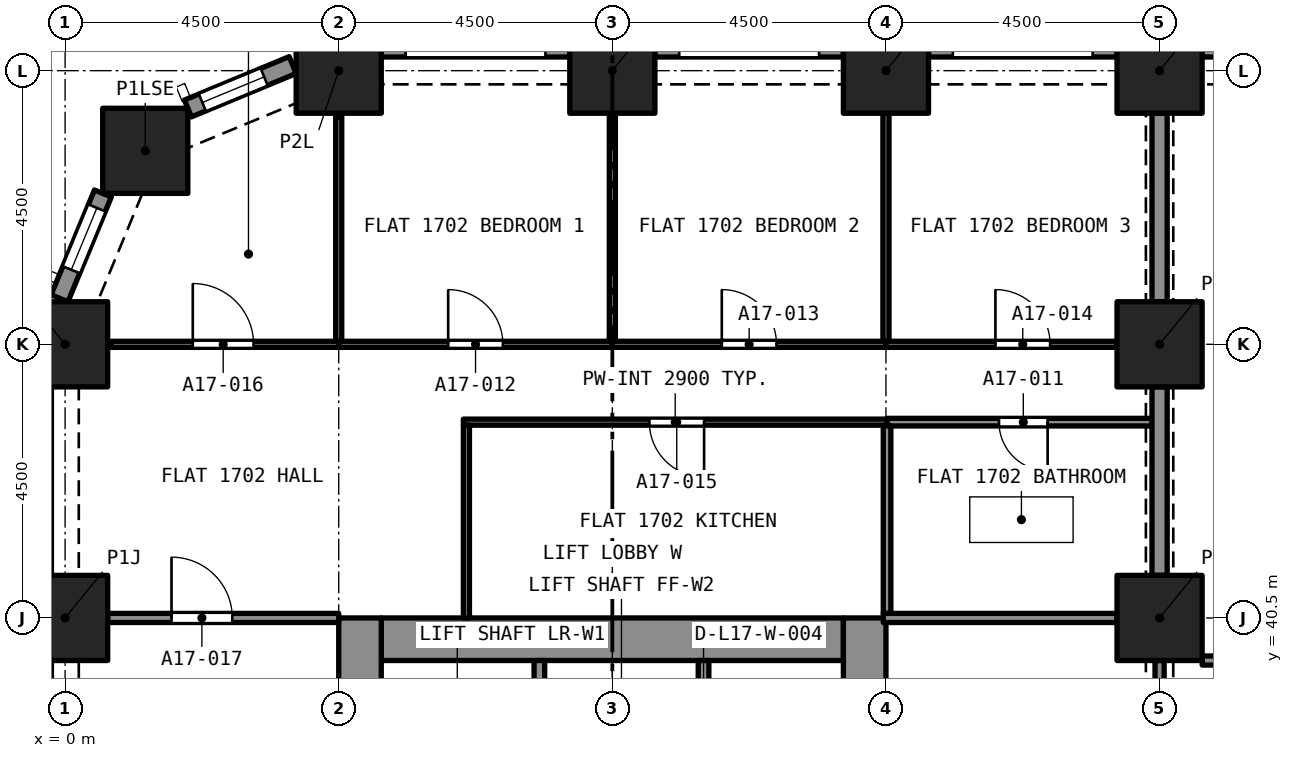
"""IFC4 building model, lengths in metres.
Left out: names, types, materials, properties, quantities, classifications, styles, units other than length and angle.
Written with IfcOpenShell. Run it as: python <this file> out.ifc"""

import sys

from ifc_helpers import new_model, si_unit, direction, frame, frame_2d, origin, origin_2d, place, context, subcontext, project, spatial, rectangle, extrude, element, fill, save


model = new_model("IFC4")
c1 = context("Model", 3, precision=1e-05, world=origin(), true_north=direction((0.0, 1.0)))
c2 = subcontext(c1, "Body", "Model", "MODEL_VIEW")
j1 = project(units=[si_unit("LENGTHUNIT", "METRE"), si_unit("PLANEANGLEUNIT", "RADIAN")], contexts=[c1])
p1 = place(None, origin())
s1 = spatial("IfcSite", under=j1, at=p1, CompositionType="ELEMENT")
p2 = place(p1, origin())
s2 = spatial("IfcBuilding", under=s1, at=p2, CompositionType="ELEMENT")
p3 = place(p2, frame((0.0, 0.0, 65.6)))
s3 = spatial("IfcBuildingStorey", under=s2, at=p3, CompositionType="ELEMENT", Elevation=65.6)
for number, where, z_axis, x_axis in (
    (1, (0.0, 40.5, 0.0), (0.0, 0.0, 1.0), (1.0, 0.0, 0.0)),
    (2, (18.0, 40.5, 0.0), (0.0, 0.0, 1.0), (1.0, 0.0, 0.0)),
    (3, (0.0, 45.0, 0.0), (0.0, 0.0, 1.0), (1.0, 0.0, 0.0)),
    (4, (18.0, 45.0, 0.0), (0.0, 0.0, 1.0), (1.0, 0.0, 0.0)),
    (5, (1.318, 48.182, 0.0), (0.0, 0.0, 1.0), (1.0, 0.0, 0.0)),
    (6, (4.5, 49.5, 0.0), (0.0, 0.0, 1.0), (1.0, 0.0, 0.0)),
    (7, (9.0, 49.5, 0.0), (0.0, 0.0, 1.0), (1.0, 0.0, 0.0)),
    (8, (13.5, 49.5, 0.0), (0.0, 0.0, 1.0), (1.0, 0.0, 0.0)),
    (9, (18.0, 49.5, 0.0), (0.0, 0.0, 1.0), (1.0, 0.0, 0.0)),
):
    element("IfcColumn", number, at=place(p3, frame(where, z_axis=z_axis, x_axis=x_axis)), inside=s3, PredefinedType="COLUMN", context=c2, shape_type="SweptSolid", body=[
        extrude(rectangle(XDim=1.4, YDim=1.4, at=origin_2d()), origin(), (0.0, 0.0, 1.0), 3.2),
    ])
p4 = place(p3, frame((5.2, 40.15, 0.0), z_axis=(0.0, 0.0, 1.0), x_axis=(1.0, 0.0, 0.0)))
e10 = element("IfcWall", 10, at=p4, inside=s3, PredefinedType="SOLIDWALL", context=c2, shape_type="SweptSolid", body=[
    extrude(rectangle(XDim=7.6, YDim=0.7, at=frame_2d((3.8, 0.0))), origin(), (0.0, 0.0, 1.0), 3.2),
])
p5 = place(p3, frame((4.85, 27.0, 0.0), z_axis=(0.0, 0.0, 1.0), x_axis=(0.0, 1.0, 0.0)))
e11 = element("IfcWall", 11, at=p5, inside=s3, PredefinedType="SOLIDWALL", context=c2, shape_type="SweptSolid", body=[
    extrude(rectangle(XDim=13.5, YDim=0.7, at=frame_2d((6.75, 0.0))), origin(), (0.0, 0.0, 1.0), 3.2),
])
p6 = place(p5, frame((8.95, 0.0, 0.0)))
e12 = element("IfcOpeningElement", 12, at=p6, cuts=e11, PredefinedType="OPENING", context=c2, shape_type="SweptSolid", body=[
    extrude(rectangle(XDim=1.2, YDim=2.1, at=frame_2d((0.6, 1.05))), frame((0.0, 0.36, 0.0), z_axis=(0.0, -1.0, 0.0), x_axis=(1.0, 0.0, 0.0)), (0.0, 0.0, 1.0), 0.72),
])
p7 = place(p3, frame((13.15, 27.0, 0.0), z_axis=(0.0, 0.0, 1.0), x_axis=(0.0, 1.0, 0.0)))
e13 = element("IfcWall", 13, at=p7, inside=s3, PredefinedType="SOLIDWALL", context=c2, shape_type="SweptSolid", body=[
    extrude(rectangle(XDim=13.5, YDim=0.7, at=frame_2d((6.75, 0.0))), origin(), (0.0, 0.0, 1.0), 3.2),
])
p8 = place(p7, frame((11.1, 0.0, 0.0)))
e14 = element("IfcOpeningElement", 14, at=p8, cuts=e13, PredefinedType="OPENING", context=c2, shape_type="SweptSolid", body=[
    extrude(rectangle(XDim=1.1, YDim=2.1, at=frame_2d((0.55, 1.05))), frame((0.0, 0.36, 0.0), z_axis=(0.0, -1.0, 0.0), x_axis=(1.0, 0.0, 0.0)), (0.0, 0.0, 1.0), 0.72),
])
p9 = place(p7, frame((8.95, 0.0, 0.0)))
e15 = element("IfcOpeningElement", 15, at=p9, cuts=e13, PredefinedType="OPENING", context=c2, shape_type="SweptSolid", body=[
    extrude(rectangle(XDim=1.2, YDim=2.1, at=frame_2d((0.6, 1.05))), frame((0.0, 0.36, 0.0), z_axis=(0.0, -1.0, 0.0), x_axis=(1.0, 0.0, 0.0)), (0.0, 0.0, 1.0), 0.72),
])
p10 = place(p3, frame((18.7, 49.875, 0.0), z_axis=(0.0, 0.0, 1.0), x_axis=(1.0, 0.0, 0.0)))
e16 = element("IfcWall", 16, at=p10, inside=s3, PredefinedType="SOLIDWALL", context=c2, shape_type="SweptSolid", body=[
    extrude(rectangle(XDim=3.1, YDim=0.3, at=frame_2d((1.55, 0.0))), origin(), (0.0, 0.0, 1.0), 3.2),
])
p11 = place(p10, frame((0.4, 0.0, 0.45)))
e17 = element("IfcOpeningElement", 17, at=p11, cuts=e16, PredefinedType="OPENING", context=c2, shape_type="SweptSolid", body=[
    extrude(rectangle(XDim=2.3, YDim=1.95, at=frame_2d((1.15, 0.975))), frame((0.0, 0.16, 0.0), z_axis=(0.0, -1.0, 0.0), x_axis=(1.0, 0.0, 0.0)), (0.0, 0.0, 1.0), 0.32),
])
p12 = place(p3, frame((14.2, 49.875, 0.0), z_axis=(0.0, 0.0, 1.0), x_axis=(1.0, 0.0, 0.0)))
e18 = element("IfcWall", 18, at=p12, inside=s3, PredefinedType="SOLIDWALL", context=c2, shape_type="SweptSolid", body=[
    extrude(rectangle(XDim=3.1, YDim=0.3, at=frame_2d((1.55, 0.0))), origin(), (0.0, 0.0, 1.0), 3.2),
])
p13 = place(p12, frame((0.4, 0.0, 0.45)))
e19 = element("IfcOpeningElement", 19, at=p13, cuts=e18, PredefinedType="OPENING", context=c2, shape_type="SweptSolid", body=[
    extrude(rectangle(XDim=2.3, YDim=1.95, at=frame_2d((1.15, 0.975))), frame((0.0, 0.16, 0.0), z_axis=(0.0, -1.0, 0.0), x_axis=(1.0, 0.0, 0.0)), (0.0, 0.0, 1.0), 0.32),
])
p14 = place(p3, frame((9.7, 49.875, 0.0), z_axis=(0.0, 0.0, 1.0), x_axis=(1.0, 0.0, 0.0)))
e20 = element("IfcWall", 20, at=p14, inside=s3, PredefinedType="SOLIDWALL", context=c2, shape_type="SweptSolid", body=[
    extrude(rectangle(XDim=3.1, YDim=0.3, at=frame_2d((1.55, 0.0))), origin(), (0.0, 0.0, 1.0), 3.2),
])
p15 = place(p14, frame((0.4, 0.0, 0.45)))
e21 = element("IfcOpeningElement", 21, at=p15, cuts=e20, PredefinedType="OPENING", context=c2, shape_type="SweptSolid", body=[
    extrude(rectangle(XDim=2.3, YDim=1.95, at=frame_2d((1.15, 0.975))), frame((0.0, 0.16, 0.0), z_axis=(0.0, -1.0, 0.0), x_axis=(1.0, 0.0, 0.0)), (0.0, 0.0, 1.0), 0.32),
])
p16 = place(p3, frame((5.2, 49.875, 0.0), z_axis=(0.0, 0.0, 1.0), x_axis=(1.0, 0.0, 0.0)))
e22 = element("IfcWall", 22, at=p16, inside=s3, PredefinedType="SOLIDWALL", context=c2, shape_type="SweptSolid", body=[
    extrude(rectangle(XDim=3.1, YDim=0.3, at=frame_2d((1.55, 0.0))), origin(), (0.0, 0.0, 1.0), 3.2),
])
p17 = place(p16, frame((0.4, 0.0, 0.45)))
e23 = element("IfcOpeningElement", 23, at=p17, cuts=e22, PredefinedType="OPENING", context=c2, shape_type="SweptSolid", body=[
    extrude(rectangle(XDim=2.3, YDim=1.95, at=frame_2d((1.15, 0.975))), frame((0.0, 0.16, 0.0), z_axis=(0.0, -1.0, 0.0), x_axis=(1.0, 0.0, 0.0)), (0.0, 0.0, 1.0), 0.32),
])
p18 = place(p3, frame((2.02, 48.878, 0.0), z_axis=(0.0, 0.0, 1.0), x_axis=(0.923903565336, 0.38262540684, 0.0)))
e24 = element("IfcWall", 24, at=p18, inside=s3, PredefinedType="SOLIDWALL", context=c2, shape_type="SweptSolid", body=[
    extrude(rectangle(XDim=1.865, YDim=0.3, at=frame_2d((0.933, 0.0))), origin(), (0.0, 0.0, 1.0), 3.2),
])
p19 = place(p18, frame((0.258, 0.0, 0.45)))
e25 = element("IfcOpeningElement", 25, at=p19, cuts=e24, PredefinedType="OPENING", context=c2, shape_type="SweptSolid", body=[
    extrude(rectangle(XDim=1.1, YDim=1.95, at=frame_2d((0.55, 0.975))), frame((0.0, 0.16, 0.0), z_axis=(0.0, -1.0, 0.0), x_axis=(1.0, 0.0, 0.0)), (0.0, 0.0, 1.0), 0.32),
])
p20 = place(p3, frame((-0.092, 45.757, 0.0), z_axis=(0.0, 0.0, 1.0), x_axis=(0.382737135771, 0.923857286003, 0.0)))
e26 = element("IfcWall", 26, at=p20, inside=s3, PredefinedType="SOLIDWALL", context=c2, shape_type="SweptSolid", body=[
    extrude(rectangle(XDim=1.865, YDim=0.3, at=frame_2d((0.933, 0.0))), origin(), (0.0, 0.0, 1.0), 3.2),
])
p21 = place(p20, frame((0.508, 0.0, 0.45)))
e27 = element("IfcOpeningElement", 27, at=p21, cuts=e26, PredefinedType="OPENING", context=c2, shape_type="SweptSolid", body=[
    extrude(rectangle(XDim=1.1, YDim=1.95, at=frame_2d((0.55, 0.975))), frame((0.0, 0.16, 0.0), z_axis=(0.0, -1.0, 0.0), x_axis=(1.0, 0.0, 0.0)), (0.0, 0.0, 1.0), 0.32),
])
p22 = place(p3, frame((17.875, 43.72, 0.0), z_axis=(0.0, 0.0, 1.0), x_axis=(-1.0, 0.0, 0.0)))
e28 = element("IfcWall", 28, at=p22, inside=s3, PredefinedType="PARTITIONING", context=c2, shape_type="SweptSolid", body=[
    extrude(rectangle(XDim=4.357, YDim=0.125, at=frame_2d((2.178, 0.0))), origin(), (0.0, 0.0, 1.0), 2.9),
])
p23 = place(p22, frame((1.716, 0.0, 0.0)))
e29 = element("IfcOpeningElement", 29, at=p23, cuts=e28, PredefinedType="OPENING", context=c2, shape_type="SweptSolid", body=[
    extrude(rectangle(XDim=0.8, YDim=2.1, at=frame_2d((0.4, 1.05))), frame((0.0, 0.073, 0.0), z_axis=(0.0, -1.0, 0.0), x_axis=(1.0, 0.0, 0.0)), (0.0, 0.0, 1.0), 0.145),
])
p24 = place(p3, frame((13.518, 40.575, 0.0), z_axis=(0.0, 0.0, 1.0), x_axis=(0.0, 1.0, 0.0)))
e30 = element("IfcWall", 30, at=p24, inside=s3, PredefinedType="PARTITIONING", context=c2, shape_type="SweptSolid", body=[
    extrude(rectangle(XDim=3.083, YDim=0.125, at=frame_2d((1.541, 0.0))), origin(), (0.0, 0.0, 1.0), 2.9),
])
p25 = place(p3, frame((18.0, 41.2, 0.0), z_axis=(0.0, 0.0, 1.0), x_axis=(0.0, 1.0, 0.0)))
e31 = element("IfcWall", 31, at=p25, inside=s3, PredefinedType="PARTITIONING", context=c2, shape_type="SweptSolid", body=[
    extrude(rectangle(XDim=3.1, YDim=0.25, at=frame_2d((1.55, 0.0))), origin(), (0.0, 0.0, 1.0), 2.38),
])
p26 = place(p3, frame((13.456, 40.5, 0.0), z_axis=(0.0, 0.0, 1.0), x_axis=(1.0, 0.0, 0.0)))
e32 = element("IfcWall", 32, at=p26, inside=s3, PredefinedType="PARTITIONING", context=c2, shape_type="SweptSolid", body=[
    extrude(rectangle(XDim=3.844, YDim=0.15, at=frame_2d((1.922, 0.0))), origin(), (0.0, 0.0, 1.0), 2.9),
])
p27 = place(p3, frame((9.0, 45.05, 0.0), z_axis=(0.0, 0.0, 1.0), x_axis=(0.0, 1.0, 0.0)))
e33 = element("IfcWall", 33, at=p27, inside=s3, PredefinedType="PARTITIONING", context=c2, shape_type="SweptSolid", body=[
    extrude(rectangle(XDim=3.75, YDim=0.1, at=frame_2d((1.875, 0.0))), origin(), (0.0, 0.0, 1.0), 2.9),
])
p28 = place(p3, frame((4.5, 45.0, 0.0), z_axis=(0.0, 0.0, 1.0), x_axis=(1.0, 0.0, 0.0)))
e34 = element("IfcWall", 34, at=p28, inside=s3, PredefinedType="PARTITIONING", context=c2, shape_type="SweptSolid", body=[
    extrude(rectangle(XDim=4.5, YDim=0.1, at=frame_2d((2.25, 0.0))), origin(), (0.0, 0.0, 1.0), 2.9),
])
p29 = place(p28, frame((1.8, 0.0, 0.0)))
e35 = element("IfcOpeningElement", 35, at=p29, cuts=e34, PredefinedType="OPENING", context=c2, shape_type="SweptSolid", body=[
    extrude(rectangle(XDim=0.9, YDim=2.1, at=frame_2d((0.45, 1.05))), frame((0.0, 0.06, 0.0), z_axis=(0.0, -1.0, 0.0), x_axis=(1.0, 0.0, 0.0)), (0.0, 0.0, 1.0), 0.12),
])
p30 = place(p3, frame((4.5, 45.05, 0.0), z_axis=(0.0, 0.0, 1.0), x_axis=(0.0, 1.0, 0.0)))
e36 = element("IfcWall", 36, at=p30, inside=s3, PredefinedType="PARTITIONING", context=c2, shape_type="SweptSolid", body=[
    extrude(rectangle(XDim=3.692, YDim=0.1, at=frame_2d((1.846, 0.0))), origin(), (0.0, 0.0, 1.0), 2.9),
])
p31 = place(p3, frame((13.5, 45.05, 0.0), z_axis=(0.0, 0.0, 1.0), x_axis=(0.0, 1.0, 0.0)))
e37 = element("IfcWall", 37, at=p31, inside=s3, PredefinedType="PARTITIONING", context=c2, shape_type="SweptSolid", body=[
    extrude(rectangle(XDim=3.75, YDim=0.1, at=frame_2d((1.875, 0.0))), origin(), (0.0, 0.0, 1.0), 2.9),
])
p32 = place(p3, frame((9.0, 45.0, 0.0), z_axis=(0.0, 0.0, 1.0), x_axis=(1.0, 0.0, 0.0)))
e38 = element("IfcWall", 38, at=p32, inside=s3, PredefinedType="PARTITIONING", context=c2, shape_type="SweptSolid", body=[
    extrude(rectangle(XDim=4.5, YDim=0.1, at=frame_2d((2.25, 0.0))), origin(), (0.0, 0.0, 1.0), 2.9),
])
p33 = place(p32, frame((1.8, 0.0, 0.0)))
e39 = element("IfcOpeningElement", 39, at=p33, cuts=e38, PredefinedType="OPENING", context=c2, shape_type="SweptSolid", body=[
    extrude(rectangle(XDim=0.9, YDim=2.1, at=frame_2d((0.45, 1.05))), frame((0.0, 0.06, 0.0), z_axis=(0.0, -1.0, 0.0), x_axis=(1.0, 0.0, 0.0)), (0.0, 0.0, 1.0), 0.12),
])
p34 = place(p3, frame((13.5, 45.0, 0.0), z_axis=(0.0, 0.0, 1.0), x_axis=(1.0, 0.0, 0.0)))
e40 = element("IfcWall", 40, at=p34, inside=s3, PredefinedType="PARTITIONING", context=c2, shape_type="SweptSolid", body=[
    extrude(rectangle(XDim=3.8, YDim=0.1, at=frame_2d((1.9, 0.0))), origin(), (0.0, 0.0, 1.0), 2.9),
])
p35 = place(p34, frame((1.8, 0.0, 0.0)))
e41 = element("IfcOpeningElement", 41, at=p35, cuts=e40, PredefinedType="OPENING", context=c2, shape_type="SweptSolid", body=[
    extrude(rectangle(XDim=0.9, YDim=2.1, at=frame_2d((0.45, 1.05))), frame((0.0, 0.06, 0.0), z_axis=(0.0, -1.0, 0.0), x_axis=(1.0, 0.0, 0.0)), (0.0, 0.0, 1.0), 0.12),
])
p36 = place(p3, frame((18.0, 45.7, 0.0), z_axis=(0.0, 0.0, 1.0), x_axis=(0.0, 1.0, 0.0)))
e42 = element("IfcWall", 42, at=p36, inside=s3, PredefinedType="PARTITIONING", context=c2, shape_type="SweptSolid", body=[
    extrude(rectangle(XDim=3.1, YDim=0.25, at=frame_2d((1.55, 0.0))), origin(), (0.0, 0.0, 1.0), 2.38),
])
p37 = place(p3, frame((13.518, 43.72, 0.0), z_axis=(0.0, 0.0, 1.0), x_axis=(-1.0, 0.0, 0.0)))
e43 = element("IfcWall", 43, at=p37, inside=s3, PredefinedType="PARTITIONING", context=c2, shape_type="SweptSolid", body=[
    extrude(rectangle(XDim=6.968, YDim=0.1, at=frame_2d((3.484, 0.0))), origin(), (0.0, 0.0, 1.0), 2.9),
])
p38 = place(p37, frame((3.009, 0.0, 0.0)))
e44 = element("IfcOpeningElement", 44, at=p38, cuts=e43, PredefinedType="OPENING", context=c2, shape_type="SweptSolid", body=[
    extrude(rectangle(XDim=0.9, YDim=2.1, at=frame_2d((0.45, 1.05))), frame((0.0, 0.06, 0.0), z_axis=(0.0, -1.0, 0.0), x_axis=(1.0, 0.0, 0.0)), (0.0, 0.0, 1.0), 0.12),
])
p39 = place(p3, frame((6.6, 40.5, 0.0), z_axis=(0.0, 0.0, 1.0), x_axis=(0.0, 1.0, 0.0)))
e45 = element("IfcWall", 45, at=p39, inside=s3, PredefinedType="PARTITIONING", context=c2, shape_type="SweptSolid", body=[
    extrude(rectangle(XDim=3.17, YDim=0.1, at=frame_2d((1.585, 0.0))), origin(), (0.0, 0.0, 1.0), 2.9),
])
p40 = place(p3, frame((0.758, 45.0, 0.0), z_axis=(0.0, 0.0, 1.0), x_axis=(1.0, 0.0, 0.0)))
e46 = element("IfcWall", 46, at=p40, inside=s3, PredefinedType="PARTITIONING", context=c2, shape_type="SweptSolid", body=[
    extrude(rectangle(XDim=3.742, YDim=0.1, at=frame_2d((1.871, 0.0))), origin(), (0.0, 0.0, 1.0), 2.9),
])
p41 = place(p40, frame((1.342, 0.0, 0.0)))
e47 = element("IfcOpeningElement", 47, at=p41, cuts=e46, PredefinedType="OPENING", context=c2, shape_type="SweptSolid", body=[
    extrude(rectangle(XDim=1.0, YDim=2.1, at=frame_2d((0.5, 1.05))), frame((0.0, 0.06, 0.0), z_axis=(0.0, -1.0, 0.0), x_axis=(1.0, 0.0, 0.0)), (0.0, 0.0, 1.0), 0.12),
])
p42 = place(p3, frame((0.7, 40.5, 0.0), z_axis=(0.0, 0.0, 1.0), x_axis=(1.0, 0.0, 0.0)))
e48 = element("IfcWall", 48, at=p42, inside=s3, PredefinedType="PARTITIONING", context=c2, shape_type="SweptSolid", body=[
    extrude(rectangle(XDim=3.8, YDim=0.15, at=frame_2d((1.9, 0.0))), origin(), (0.0, 0.0, 1.0), 2.9),
])
p43 = place(p42, frame((1.05, 0.0, 0.0)))
e49 = element("IfcOpeningElement", 49, at=p43, cuts=e48, PredefinedType="OPENING", context=c2, shape_type="SweptSolid", body=[
    extrude(rectangle(XDim=1.0, YDim=2.1, at=frame_2d((0.5, 1.05))), frame((0.0, 0.085, 0.0), z_axis=(0.0, -1.0, 0.0), x_axis=(1.0, 0.0, 0.0)), (0.0, 0.0, 1.0), 0.17),
])
p44 = place(p3, frame((18.7, 39.8, 0.0), z_axis=(0.0, 0.0, 1.0), x_axis=(1.0, 0.0, 0.0)))
e50 = element("IfcWall", 50, at=p44, inside=s3, PredefinedType="PARTITIONING", context=c2, shape_type="SweptSolid", body=[
    extrude(rectangle(XDim=8.3, YDim=0.15, at=frame_2d((4.15, 0.0))), origin(), (0.0, 0.0, 1.0), 2.75),
])
p45 = place(p44, frame((3.3, 0.0, 0.0)))
e51 = element("IfcOpeningElement", 51, at=p45, cuts=e50, PredefinedType="OPENING", context=c2, shape_type="SweptSolid", body=[
    extrude(rectangle(XDim=1.0, YDim=2.1, at=frame_2d((0.5, 1.05))), frame((0.0, 0.085, 0.0), z_axis=(0.0, -1.0, 0.0), x_axis=(1.0, 0.0, 0.0)), (0.0, 0.0, 1.0), 0.17),
])
p46 = place(p3, frame((18.0, 39.8, 0.0), z_axis=(0.0, 0.0, 1.0), x_axis=(0.0, -1.0, 0.0)))
e52 = element("IfcWall", 52, at=p46, inside=s3, PredefinedType="PARTITIONING", context=c2, shape_type="SweptSolid", body=[
    extrude(rectangle(XDim=3.1, YDim=0.15, at=frame_2d((1.55, 0.0))), origin(), (0.0, 0.0, 1.0), 2.38),
])
p47 = place(p46, frame((0.95, 0.0, 0.0)))
e53 = element("IfcOpeningElement", 53, at=p47, cuts=e52, PredefinedType="OPENING", context=c2, shape_type="SweptSolid", body=[
    extrude(rectangle(XDim=1.2, YDim=2.1, at=frame_2d((0.6, 1.05))), frame((0.0, 0.085, 0.0), z_axis=(0.0, -1.0, 0.0), x_axis=(1.0, 0.0, 0.0)), (0.0, 0.0, 1.0), 0.17),
])
p48 = place(p3, frame((7.8, 37.5, 0.0), z_axis=(0.0, 0.0, 1.0), x_axis=(0.0, 1.0, 0.0)))
e54 = element("IfcWall", 54, at=p48, inside=s3, PredefinedType="SOLIDWALL", context=c2, shape_type="SweptSolid", body=[
    extrude(rectangle(XDim=2.3, YDim=0.175, at=frame_2d((1.15, 0.0))), origin(), (0.0, 0.0, 1.0), 2.9),
])
p49 = place(p3, frame((10.5, 37.5, 0.0), z_axis=(0.0, 0.0, 1.0), x_axis=(0.0, 1.0, 0.0)))
e55 = element("IfcWall", 55, at=p49, inside=s3, PredefinedType="SOLIDWALL", context=c2, shape_type="SweptSolid", body=[
    extrude(rectangle(XDim=2.3, YDim=0.175, at=frame_2d((1.15, 0.0))), origin(), (0.0, 0.0, 1.0), 2.9),
])
p50 = place(p49, frame((0.65, 0.0, 0.0)))
e56 = element("IfcOpeningElement", 56, at=p50, cuts=e55, PredefinedType="OPENING", context=c2, shape_type="SweptSolid", body=[
    extrude(rectangle(XDim=1.0, YDim=2.1, at=frame_2d((0.5, 1.05))), frame((0.0, 0.097, 0.0), z_axis=(0.0, -1.0, 0.0), x_axis=(1.0, 0.0, 0.0)), (0.0, 0.0, 1.0), 0.195),
])
p51 = place(p19, origin())
e57 = element("IfcWindow", 57, at=p51, inside=s3, PartitioningType="SINGLE_PANEL", PredefinedType="WINDOW", context=c2, shape_type="SweptSolid", body=[
    extrude(rectangle(XDim=1.1, YDim=1.95, at=frame_2d((0.55, 0.975))), frame((0.0, 0.03, 0.0), z_axis=(0.0, -1.0, 0.0), x_axis=(1.0, 0.0, 0.0)), (0.0, 0.0, 1.0), 0.06),
])
fill(e25, e57)
p52 = place(p21, origin())
e58 = element("IfcWindow", 58, at=p52, inside=s3, PartitioningType="SINGLE_PANEL", PredefinedType="WINDOW", context=c2, shape_type="SweptSolid", body=[
    extrude(rectangle(XDim=1.1, YDim=1.95, at=frame_2d((0.55, 0.975))), frame((0.0, 0.03, 0.0), z_axis=(0.0, -1.0, 0.0), x_axis=(1.0, 0.0, 0.0)), (0.0, 0.0, 1.0), 0.06),
])
fill(e27, e58)
p53 = place(p23, origin())
e59 = element("IfcDoor", 59, at=p53, inside=s3, OperationType="SINGLE_SWING_LEFT", PredefinedType="DOOR", context=c2, shape_type="SweptSolid", body=[
    extrude(rectangle(XDim=0.8, YDim=2.1, at=frame_2d((0.4, 1.05))), frame((0.0, 0.025, 0.0), z_axis=(0.0, -1.0, 0.0), x_axis=(1.0, 0.0, 0.0)), (0.0, 0.0, 1.0), 0.05),
])
fill(e29, e59)
p54 = place(p29, origin())
e60 = element("IfcDoor", 60, at=p54, inside=s3, OperationType="SINGLE_SWING_RIGHT", PredefinedType="DOOR", context=c2, shape_type="SweptSolid", body=[
    extrude(rectangle(XDim=0.9, YDim=2.1, at=frame_2d((0.45, 1.05))), frame((0.0, 0.025, 0.0), z_axis=(0.0, -1.0, 0.0), x_axis=(1.0, 0.0, 0.0)), (0.0, 0.0, 1.0), 0.05),
])
fill(e35, e60)
p55 = place(p33, origin())
e61 = element("IfcDoor", 61, at=p55, inside=s3, OperationType="SINGLE_SWING_LEFT", PredefinedType="DOOR", context=c2, shape_type="SweptSolid", body=[
    extrude(rectangle(XDim=0.9, YDim=2.1, at=frame_2d((0.45, 1.05))), frame((0.0, 0.025, 0.0), z_axis=(0.0, -1.0, 0.0), x_axis=(1.0, 0.0, 0.0)), (0.0, 0.0, 1.0), 0.05),
])
fill(e39, e61)
p56 = place(p35, origin())
e62 = element("IfcDoor", 62, at=p56, inside=s3, OperationType="SINGLE_SWING_RIGHT", PredefinedType="DOOR", context=c2, shape_type="SweptSolid", body=[
    extrude(rectangle(XDim=0.9, YDim=2.1, at=frame_2d((0.45, 1.05))), frame((0.0, 0.025, 0.0), z_axis=(0.0, -1.0, 0.0), x_axis=(1.0, 0.0, 0.0)), (0.0, 0.0, 1.0), 0.05),
])
fill(e41, e62)
p57 = place(p38, origin())
e63 = element("IfcDoor", 63, at=p57, inside=s3, OperationType="SINGLE_SWING_LEFT", PredefinedType="DOOR", context=c2, shape_type="SweptSolid", body=[
    extrude(rectangle(XDim=0.9, YDim=2.1, at=frame_2d((0.45, 1.05))), frame((0.0, 0.025, 0.0), z_axis=(0.0, -1.0, 0.0), x_axis=(1.0, 0.0, 0.0)), (0.0, 0.0, 1.0), 0.05),
])
fill(e44, e63)
p58 = place(p41, origin())
e64 = element("IfcDoor", 64, at=p58, inside=s3, OperationType="SINGLE_SWING_LEFT", PredefinedType="DOOR", context=c2, shape_type="SweptSolid", body=[
    extrude(rectangle(XDim=1.0, YDim=2.1, at=frame_2d((0.5, 1.05))), frame((0.0, 0.025, 0.0), z_axis=(0.0, -1.0, 0.0), x_axis=(1.0, 0.0, 0.0)), (0.0, 0.0, 1.0), 0.05),
])
fill(e47, e64)
p59 = place(p43, origin())
e65 = element("IfcDoor", 65, at=p59, inside=s3, OperationType="SINGLE_SWING_LEFT", PredefinedType="DOOR", context=c2, shape_type="SweptSolid", body=[
    extrude(rectangle(XDim=1.0, YDim=2.1, at=frame_2d((0.5, 1.05))), frame((0.0, 0.025, 0.0), z_axis=(0.0, -1.0, 0.0), x_axis=(1.0, 0.0, 0.0)), (0.0, 0.0, 1.0), 0.05),
])
fill(e49, e65)
save(model, sys.argv[1])
